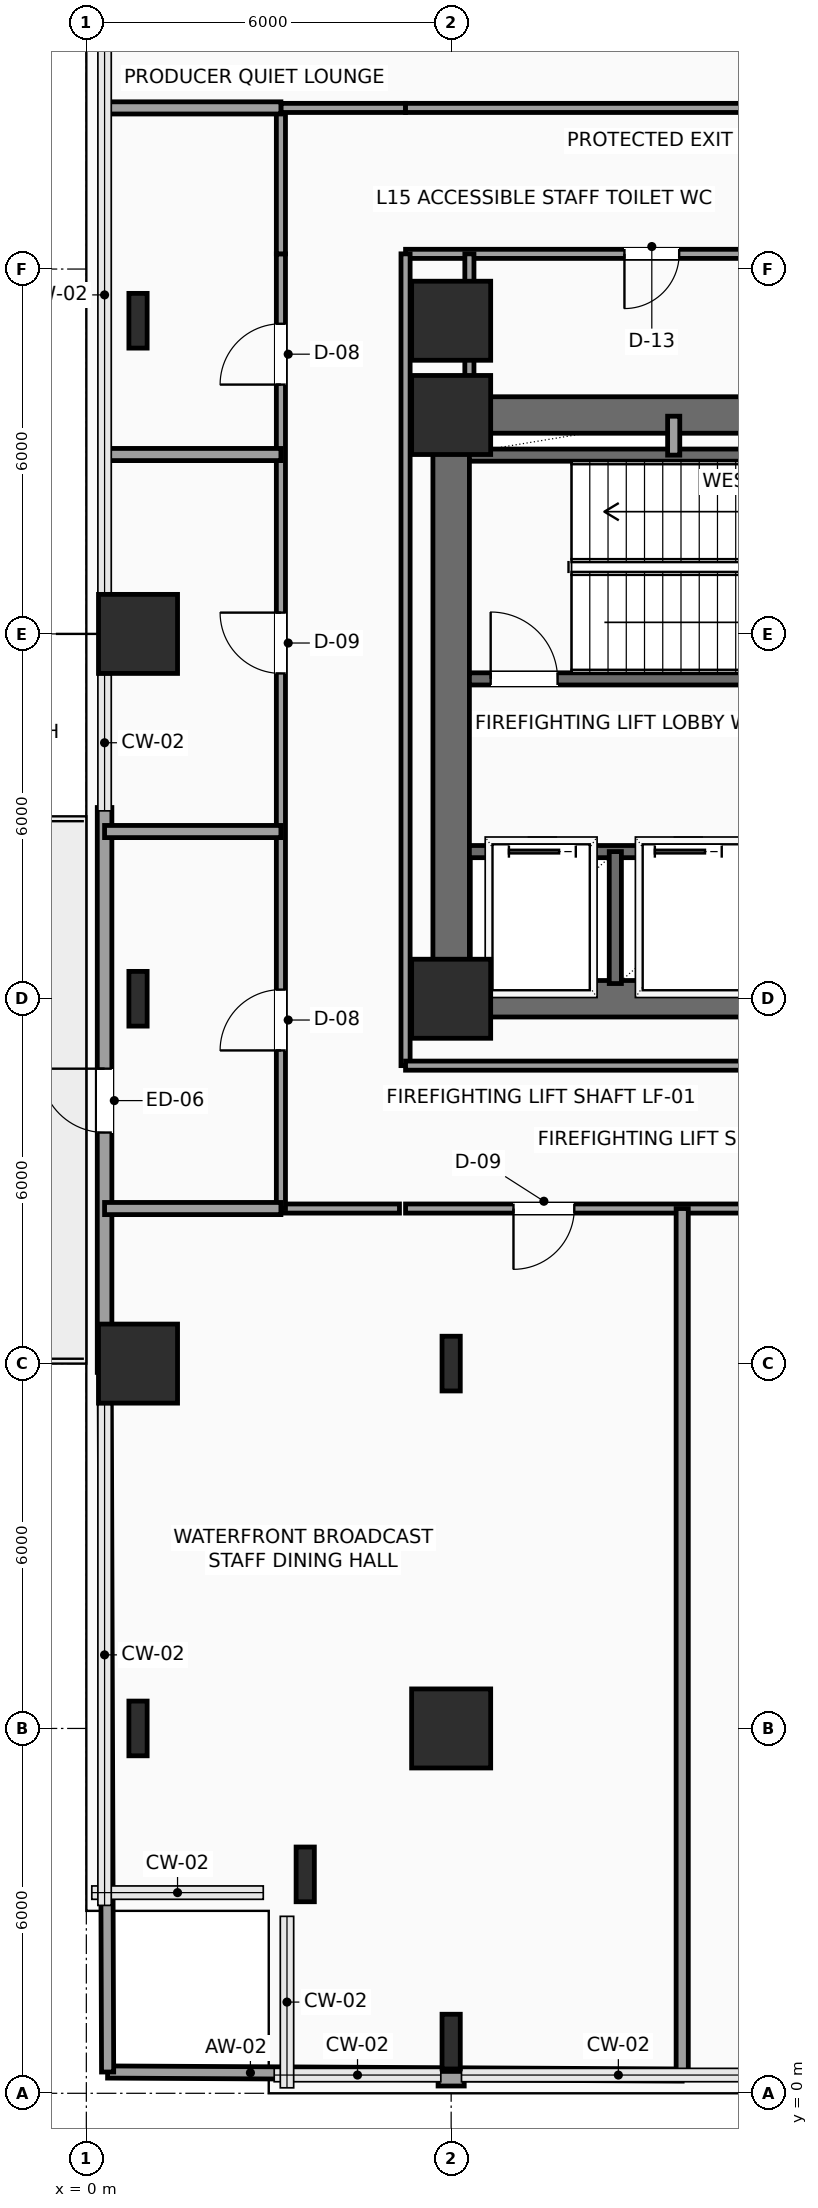
"""IFC4 building model, lengths in metres.
Left out: names, types, materials, properties, quantities, classifications, styles, units other than length and angle.
Written with IfcOpenShell. Run it as: python <this file> out.ifc"""

import sys

from ifc_helpers import new_model, si_unit, direction, frame, frame_2d, origin, origin_2d, place, context, subcontext, project, spatial, rectangle, i_section, extrude, element, fill, save


model = new_model("IFC4")
c1 = context("Model", 3, precision=1e-05, world=origin(), true_north=direction((0.0, 1.0)))
c2 = subcontext(c1, "Body", "Model", "MODEL_VIEW")
j1 = project(units=[si_unit("LENGTHUNIT", "METRE"), si_unit("PLANEANGLEUNIT", "RADIAN")], contexts=[c1])
p1 = place(None, origin())
s1 = spatial("IfcSite", under=j1, at=p1, CompositionType="ELEMENT")
p2 = place(p1, origin())
s2 = spatial("IfcBuilding", under=s1, at=p2, CompositionType="ELEMENT")
p3 = place(p2, frame((0.0, 0.0, 67.5)))
s3 = spatial("IfcBuildingStorey", under=s2, at=p3, CompositionType="ELEMENT", Elevation=67.5)
for number, where, z_axis, x_axis in (
    (1, (6.0, 18.0, 0.0), (0.0, 0.0, 1.0), (1.0, 0.0, 0.0)),
    (2, (6.0, 27.6, 0.0), (0.0, 0.0, 1.0), (1.0, 0.0, 0.0)),
):
    element("IfcColumn", number, at=place(p3, frame(where, z_axis=z_axis, x_axis=x_axis)), inside=s3, PredefinedType="COLUMN", context=c2, shape_type="SweptSolid", body=[
        extrude(rectangle(XDim=1.3, YDim=1.3, at=origin_2d()), origin(), (0.0, 0.0, 1.0), 3.9),
    ])
for number, where, z_axis, x_axis in (
    (3, (3.6, 3.6, 0.0), (0.0, 0.0, 1.0), (1.0, 0.0, 0.0)),
    (4, (0.85, 6.0, 0.0), (0.0, 0.0, 1.0), (1.0, 0.0, 0.0)),
):
    element("IfcColumn", number, at=place(p3, frame(where, z_axis=z_axis, x_axis=x_axis)), inside=s3, PredefinedType="COLUMN", context=c2, shape_type="SweptSolid", body=[
        extrude(i_section(OverallWidth=0.3, OverallDepth=0.9, WebThickness=0.019, FlangeThickness=0.035, FilletRadius=0.03, at=origin_2d()), origin(), (0.0, 0.0, 1.0), 3.9),
    ])
p4 = place(p3, frame((0.85, 12.0, 0.0), z_axis=(0.0, 0.0, 1.0), x_axis=(1.0, 0.0, 0.0)))
e5 = element("IfcColumn", 5, at=p4, inside=s3, PredefinedType="COLUMN", context=c2, shape_type="SweptSolid", body=[
    extrude(rectangle(XDim=1.3, YDim=1.3, at=origin_2d()), origin(), (0.0, 0.0, 1.0), 3.9),
])
p5 = place(p3, frame((0.85, 18.0, 0.0), z_axis=(0.0, 0.0, 1.0), x_axis=(1.0, 0.0, 0.0)))
e6 = element("IfcColumn", 6, at=p5, inside=s3, PredefinedType="COLUMN", context=c2, shape_type="SweptSolid", body=[
    extrude(i_section(OverallWidth=0.3, OverallDepth=0.9, WebThickness=0.019, FlangeThickness=0.035, FilletRadius=0.03, at=origin_2d()), origin(), (0.0, 0.0, 1.0), 3.9),
])
p6 = place(p3, frame((0.85, 24.0, 0.0), z_axis=(0.0, 0.0, 1.0), x_axis=(1.0, 0.0, 0.0)))
e7 = element("IfcColumn", 7, at=p6, inside=s3, PredefinedType="COLUMN", context=c2, shape_type="SweptSolid", body=[
    extrude(rectangle(XDim=1.3, YDim=1.3, at=origin_2d()), origin(), (0.0, 0.0, 1.0), 3.9),
])
for number, where, z_axis, x_axis in (
    (8, (0.85, 29.15, 0.0), (0.0, 0.0, 1.0), (1.0, 0.0, 0.0)),
    (9, (6.0, 0.85, 0.0), (0.0, 0.0, 1.0), (1.0, 0.0, 0.0)),
):
    element("IfcColumn", number, at=place(p3, frame(where, z_axis=z_axis, x_axis=x_axis)), inside=s3, PredefinedType="COLUMN", context=c2, shape_type="SweptSolid", body=[
        extrude(i_section(OverallWidth=0.3, OverallDepth=0.9, WebThickness=0.019, FlangeThickness=0.035, FilletRadius=0.03, at=origin_2d()), origin(), (0.0, 0.0, 1.0), 3.9),
    ])
p7 = place(p3, frame((6.0, 6.0, 0.0), z_axis=(0.0, 0.0, 1.0), x_axis=(1.0, 0.0, 0.0)))
e10 = element("IfcColumn", 10, at=p7, inside=s3, PredefinedType="COLUMN", context=c2, shape_type="SweptSolid", body=[
    extrude(rectangle(XDim=1.3, YDim=1.3, at=origin_2d()), origin(), (0.0, 0.0, 1.0), 3.9),
])
p8 = place(p3, frame((6.0, 12.0, 0.0), z_axis=(0.0, 0.0, 1.0), x_axis=(1.0, 0.0, 0.0)))
e11 = element("IfcColumn", 11, at=p8, inside=s3, PredefinedType="COLUMN", context=c2, shape_type="SweptSolid", body=[
    extrude(i_section(OverallWidth=0.3, OverallDepth=0.9, WebThickness=0.019, FlangeThickness=0.035, FilletRadius=0.03, at=origin_2d()), origin(), (0.0, 0.0, 1.0), 3.9),
])
p9 = place(p3, frame((6.0, 29.15, 0.0), z_axis=(0.0, 0.0, 1.0), x_axis=(1.0, 0.0, 0.0)))
e12 = element("IfcColumn", 12, at=p9, inside=s3, PredefinedType="COLUMN", context=c2, shape_type="SweptSolid", body=[
    extrude(rectangle(XDim=1.3, YDim=1.3, at=origin_2d()), origin(), (0.0, 0.0, 1.0), 3.9),
])
p10 = place(p3, frame((0.3, 11.855, 0.0), z_axis=(0.0, 0.0, 1.0), x_axis=(0.0, 1.0, 0.0)))
e13 = element("IfcWall", 13, at=p10, inside=s3, PredefinedType="SOLIDWALL", context=c2, shape_type="SweptSolid", body=[
    extrude(rectangle(XDim=9.29, YDim=0.24, at=frame_2d((4.645, 0.0))), origin(), (0.0, 0.0, 1.0), 3.65),
])
p11 = place(p10, frame((3.945, 0.0, 0.0)))
e14 = element("IfcOpeningElement", 14, at=p11, cuts=e13, PredefinedType="OPENING", context=c2, shape_type="SweptSolid", body=[
    extrude(rectangle(XDim=1.05, YDim=2.2, at=frame_2d((0.525, 1.1))), frame((0.0, 0.13, 0.0), z_axis=(0.0, -1.0, 0.0), x_axis=(1.0, 0.0, 0.0)), (0.0, 0.0, 1.0), 0.26),
])
p12 = place(p3, frame((6.215, 0.24, 0.0), z_axis=(0.0, 0.0, 1.0), x_axis=(-1.0, 0.0, 0.0)))
e15 = element("IfcWall", 15, at=p12, inside=s3, PredefinedType="SOLIDWALL", context=c2, shape_type="SweptSolid", body=[
    extrude(rectangle(XDim=0.43, YDim=0.24, at=frame_2d((0.215, 0.0))), origin(), (0.0, 0.0, 1.0), 3.65),
])
p13 = place(p3, frame((6.0, 18.0, 0.0), z_axis=(0.0, 0.0, 1.0), x_axis=(1.0, 0.0, 0.0)))
e16 = element("IfcWall", 16, at=p13, inside=s3, PredefinedType="SHEAR", context=c2, shape_type="SweptSolid", body=[
    extrude(rectangle(XDim=12.0, YDim=0.6, at=frame_2d((6.0, 0.0))), origin(), (0.0, 0.0, 1.0), 3.65),
])
p14 = place(p13, frame((7.15, 0.0, 0.0)))
e17 = element("IfcOpeningElement", 17, at=p14, cuts=e16, PredefinedType="OPENING", context=c2, shape_type="SweptSolid", body=[
    extrude(rectangle(XDim=1.6, YDim=2.3, at=frame_2d((0.8, 1.15))), frame((0.0, 0.31, 0.0), z_axis=(0.0, -1.0, 0.0), x_axis=(1.0, 0.0, 0.0)), (0.0, 0.0, 1.0), 0.62),
])
p15 = place(p3, frame((6.0, 27.6, 0.0), z_axis=(0.0, 0.0, 1.0), x_axis=(1.0, 0.0, 0.0)))
e18 = element("IfcWall", 18, at=p15, inside=s3, PredefinedType="SHEAR", context=c2, shape_type="SweptSolid", body=[
    extrude(rectangle(XDim=12.0, YDim=0.6, at=frame_2d((6.0, 0.0))), origin(), (0.0, 0.0, 1.0), 3.65),
])
p16 = place(p15, frame((10.2, 0.0, 0.0)))
e19 = element("IfcOpeningElement", 19, at=p16, cuts=e18, PredefinedType="OPENING", context=c2, shape_type="SweptSolid", body=[
    extrude(rectangle(XDim=0.9, YDim=2.15, at=frame_2d((0.45, 1.075))), frame((0.0, 0.31, 0.0), z_axis=(0.0, -1.0, 0.0), x_axis=(1.0, 0.0, 0.0)), (0.0, 0.0, 1.0), 0.62),
])
p17 = place(p3, frame((6.0, 18.0, 0.0), z_axis=(0.0, 0.0, 1.0), x_axis=(0.0, 1.0, 0.0)))
e20 = element("IfcWall", 20, at=p17, inside=s3, PredefinedType="SHEAR", context=c2, shape_type="SweptSolid", body=[
    extrude(rectangle(XDim=9.6, YDim=0.6, at=frame_2d((4.8, 0.0))), origin(), (0.0, 0.0, 1.0), 3.65),
])
p18 = place(p3, frame((6.3, 23.26, 0.0), z_axis=(0.0, 0.0, 1.0), x_axis=(1.0, 0.0, 0.0)))
e21 = element("IfcWall", 21, at=p18, inside=s3, PredefinedType="SHEAR", context=c2, shape_type="SweptSolid", body=[
    extrude(rectangle(XDim=8.88, YDim=0.2, at=frame_2d((4.44, 0.0))), origin(), (0.0, 0.0, 1.0), 3.65),
])
p19 = place(p18, frame((0.35, 0.0, 0.0)))
e22 = element("IfcOpeningElement", 22, at=p19, cuts=e21, PredefinedType="OPENING", context=c2, shape_type="SweptSolid", body=[
    extrude(rectangle(XDim=1.1, YDim=2.2, at=frame_2d((0.55, 1.1))), frame((0.0, 0.11, 0.0), z_axis=(0.0, -1.0, 0.0), x_axis=(1.0, 0.0, 0.0)), (0.0, 0.0, 1.0), 0.22),
])
p20 = place(p3, frame((6.3, 26.94, 0.0), z_axis=(0.0, 0.0, 1.0), x_axis=(1.0, 0.0, 0.0)))
e23 = element("IfcWall", 23, at=p20, inside=s3, PredefinedType="SHEAR", context=c2, shape_type="SweptSolid", body=[
    extrude(rectangle(XDim=8.88, YDim=0.2, at=frame_2d((4.44, 0.0))), origin(), (0.0, 0.0, 1.0), 3.65),
])
p21 = place(p3, frame((6.3, 20.42, 0.0), z_axis=(0.0, 0.0, 1.0), x_axis=(1.0, 0.0, 0.0)))
e24 = element("IfcWall", 24, at=p21, inside=s3, PredefinedType="SHEAR", context=c2, shape_type="SweptSolid", body=[
    extrude(rectangle(XDim=4.95, YDim=0.2, at=frame_2d((2.475, 0.0))), origin(), (0.0, 0.0, 1.0), 3.65),
])
p22 = place(p21, frame((0.65, 0.0, 0.0)))
e25 = element("IfcOpeningElement", 25, at=p22, cuts=e24, PredefinedType="OPENING", context=c2, shape_type="SweptSolid", body=[
    extrude(rectangle(XDim=1.1, YDim=2.2, at=frame_2d((0.55, 1.1))), frame((0.0, 0.11, 0.0), z_axis=(0.0, -1.0, 0.0), x_axis=(1.0, 0.0, 0.0)), (0.0, 0.0, 1.0), 0.22),
])
p23 = place(p21, frame((3.05, 0.0, 0.0)))
e26 = element("IfcOpeningElement", 26, at=p23, cuts=e24, PredefinedType="OPENING", context=c2, shape_type="SweptSolid", body=[
    extrude(rectangle(XDim=1.1, YDim=2.2, at=frame_2d((0.55, 1.1))), frame((0.0, 0.11, 0.0), z_axis=(0.0, -1.0, 0.0), x_axis=(1.0, 0.0, 0.0)), (0.0, 0.0, 1.0), 0.22),
])
p24 = place(p3, frame((8.7, 18.25, 0.0), z_axis=(0.0, 0.0, 1.0), x_axis=(0.0, 1.0, 0.0)))
e27 = element("IfcWall", 27, at=p24, inside=s3, PredefinedType="SHEAR", context=c2, shape_type="SweptSolid", body=[
    extrude(rectangle(XDim=2.17, YDim=0.2, at=frame_2d((1.085, 0.0))), origin(), (0.0, 0.0, 1.0), 3.65),
])
p25 = place(p3, frame((9.66, 26.94, 0.0), z_axis=(0.0, 0.0, 1.0), x_axis=(0.0, 1.0, 0.0)))
e28 = element("IfcWall", 28, at=p25, inside=s3, PredefinedType="SOLIDWALL", context=c2, shape_type="SweptSolid", body=[
    extrude(rectangle(XDim=0.64, YDim=0.2, at=frame_2d((0.32, 0.0))), origin(), (0.0, 0.0, 1.0), 3.65),
])
p26 = place(p3, frame((12.4, 14.55, 0.0), z_axis=(0.0, 0.0, 1.0), x_axis=(-1.0, 0.0, 0.0)))
e29 = element("IfcWall", 29, at=p26, inside=s3, PredefinedType="PARTITIONING", context=c2, shape_type="SweptSolid", body=[
    extrude(rectangle(XDim=7.15, YDim=0.15, at=frame_2d((3.575, 0.0))), origin(), (0.0, 0.0, 1.0), 3.65),
])
p27 = place(p26, frame((4.375, 0.0, 0.0)))
e30 = element("IfcOpeningElement", 30, at=p27, cuts=e29, PredefinedType="OPENING", context=c2, shape_type="SweptSolid", body=[
    extrude(rectangle(XDim=1.0, YDim=2.2, at=frame_2d((0.5, 1.1))), frame((0.0, 0.085, 0.0), z_axis=(0.0, -1.0, 0.0), x_axis=(1.0, 0.0, 0.0)), (0.0, 0.0, 1.0), 0.17),
])
p28 = place(p3, frame((5.15, 14.55, 0.0), z_axis=(0.0, 0.0, 1.0), x_axis=(-1.0, 0.0, 0.0)))
e31 = element("IfcWall", 31, at=p28, inside=s3, PredefinedType="PARTITIONING", context=c2, shape_type="SweptSolid", body=[
    extrude(rectangle(XDim=1.95, YDim=0.15, at=frame_2d((0.975, 0.0))), origin(), (0.0, 0.0, 1.0), 3.65),
])
p29 = place(p3, frame((3.2, 14.55, 0.0), z_axis=(0.0, 0.0, 1.0), x_axis=(0.0, 1.0, 0.0)))
e32 = element("IfcWall", 32, at=p29, inside=s3, PredefinedType="PARTITIONING", context=c2, shape_type="SweptSolid", body=[
    extrude(rectangle(XDim=15.7, YDim=0.15, at=frame_2d((7.85, 0.0))), origin(), (0.0, 0.0, 1.0), 3.65),
])
p30 = place(p29, frame((2.6, 0.0, 0.0)))
e33 = element("IfcOpeningElement", 33, at=p30, cuts=e32, PredefinedType="OPENING", context=c2, shape_type="SweptSolid", body=[
    extrude(rectangle(XDim=1.0, YDim=2.2, at=frame_2d((0.5, 1.1))), frame((0.0, 0.085, 0.0), z_axis=(0.0, -1.0, 0.0), x_axis=(1.0, 0.0, 0.0)), (0.0, 0.0, 1.0), 0.17),
])
p31 = place(p29, frame((8.8, 0.0, 0.0)))
e34 = element("IfcOpeningElement", 34, at=p31, cuts=e32, PredefinedType="OPENING", context=c2, shape_type="SweptSolid", body=[
    extrude(rectangle(XDim=1.0, YDim=2.2, at=frame_2d((0.5, 1.1))), frame((0.0, 0.085, 0.0), z_axis=(0.0, -1.0, 0.0), x_axis=(1.0, 0.0, 0.0)), (0.0, 0.0, 1.0), 0.17),
])
p32 = place(p29, frame((13.55, 0.0, 0.0)))
e35 = element("IfcOpeningElement", 35, at=p32, cuts=e32, PredefinedType="OPENING", context=c2, shape_type="SweptSolid", body=[
    extrude(rectangle(XDim=1.0, YDim=2.2, at=frame_2d((0.5, 1.1))), frame((0.0, 0.085, 0.0), z_axis=(0.0, -1.0, 0.0), x_axis=(1.0, 0.0, 0.0)), (0.0, 0.0, 1.0), 0.17),
])
p33 = place(p3, frame((3.2, 30.25, 0.0), z_axis=(0.0, 0.0, 1.0), x_axis=(0.0, 1.0, 0.0)))
e36 = element("IfcWall", 36, at=p33, inside=s3, PredefinedType="PARTITIONING", context=c2, shape_type="SweptSolid", body=[
    extrude(rectangle(XDim=2.4, YDim=0.15, at=frame_2d((1.2, 0.0))), origin(), (0.0, 0.0, 1.0), 3.65),
])
p34 = place(p3, frame((3.2, 32.65, 0.0), z_axis=(0.0, 0.0, 1.0), x_axis=(1.0, 0.0, 0.0)))
e37 = element("IfcWall", 37, at=p34, inside=s3, PredefinedType="PARTITIONING", context=c2, shape_type="SweptSolid", body=[
    extrude(rectangle(XDim=2.05, YDim=0.15, at=frame_2d((1.025, 0.0))), origin(), (0.0, 0.0, 1.0), 3.65),
])
p35 = place(p3, frame((5.25, 32.65, 0.0), z_axis=(0.0, 0.0, 1.0), x_axis=(1.0, 0.0, 0.0)))
e38 = element("IfcWall", 38, at=p35, inside=s3, PredefinedType="PARTITIONING", context=c2, shape_type="SweptSolid", body=[
    extrude(rectangle(XDim=8.55, YDim=0.15, at=frame_2d((4.275, 0.0))), origin(), (0.0, 0.0, 1.0), 3.65),
])
p36 = place(p3, frame((15.88, 30.25, 0.0), z_axis=(0.0, 0.0, 1.0), x_axis=(-1.0, 0.0, 0.0)))
e39 = element("IfcWall", 39, at=p36, inside=s3, PredefinedType="PARTITIONING", context=c2, shape_type="SweptSolid", body=[
    extrude(rectangle(XDim=10.63, YDim=0.15, at=frame_2d((5.315, 0.0))), origin(), (0.0, 0.0, 1.0), 3.65),
])
p37 = place(p36, frame((6.13, 0.0, 0.0)))
e40 = element("IfcOpeningElement", 40, at=p37, cuts=e39, PredefinedType="OPENING", context=c2, shape_type="SweptSolid", body=[
    extrude(rectangle(XDim=0.9, YDim=2.1, at=frame_2d((0.45, 1.05))), frame((0.0, 0.085, 0.0), z_axis=(0.0, -1.0, 0.0), x_axis=(1.0, 0.0, 0.0)), (0.0, 0.0, 1.0), 0.17),
])
p38 = place(p3, frame((5.25, 30.25, 0.0), z_axis=(0.0, 0.0, 1.0), x_axis=(0.0, -1.0, 0.0)))
e41 = element("IfcWall", 41, at=p38, inside=s3, PredefinedType="PARTITIONING", context=c2, shape_type="SweptSolid", body=[
    extrude(rectangle(XDim=13.35, YDim=0.15, at=frame_2d((6.675, 0.0))), origin(), (0.0, 0.0, 1.0), 3.65),
])
p39 = place(p3, frame((5.25, 16.9, 0.0), z_axis=(0.0, 0.0, 1.0), x_axis=(1.0, 0.0, 0.0)))
e42 = element("IfcWall", 42, at=p39, inside=s3, PredefinedType="PARTITIONING", context=c2, shape_type="SweptSolid", body=[
    extrude(rectangle(XDim=7.15, YDim=0.15, at=frame_2d((3.575, 0.0))), origin(), (0.0, 0.0, 1.0), 3.65),
])
p40 = place(p3, frame((6.3, 27.68, 0.0), z_axis=(0.0, 0.0, 1.0), x_axis=(0.0, 1.0, 0.0)))
e43 = element("IfcWall", 43, at=p40, inside=s3, PredefinedType="PARTITIONING", context=c2, shape_type="SweptSolid", body=[
    extrude(rectangle(XDim=2.57, YDim=0.15, at=frame_2d((1.285, 0.0))), origin(), (0.0, 0.0, 1.0), 2.992),
])
p41 = place(p3, frame((0.35, 0.35, 0.0), z_axis=(0.0, 0.0, 1.0), x_axis=(0.99998595132, -0.005300675722, 0.0)))
e44 = element("IfcWall", 44, at=p41, inside=s3, PredefinedType="PARTITIONING", context=c2, shape_type="SweptSolid", body=[
    extrude(rectangle(XDim=5.435, YDim=0.2, at=frame_2d((2.717, 0.0))), origin(), (0.0, 0.0, 1.0), 3.65),
])
p42 = place(p3, frame((6.215, 0.319, 0.0), z_axis=(0.0, 0.0, 1.0), x_axis=(0.999985892136, -0.005311829174, 0.0)))
e45 = element("IfcWall", 45, at=p42, inside=s3, PredefinedType="PARTITIONING", context=c2, shape_type="SweptSolid", body=[
    extrude(rectangle(XDim=3.585, YDim=0.2, at=frame_2d((1.792, 0.0))), origin(), (0.0, 0.0, 1.0), 3.65),
])
p43 = place(p3, frame((0.35, 0.35, 0.0), z_axis=(0.0, 0.0, 1.0), x_axis=(-0.003522599314, 0.999993795628, 0.0)))
e46 = element("IfcWall", 46, at=p43, inside=s3, PredefinedType="PARTITIONING", context=c2, shape_type="SweptSolid", body=[
    extrude(rectangle(XDim=11.505, YDim=0.2, at=frame_2d((5.752, 0.0))), origin(), (0.0, 0.0, 1.0), 3.65),
])
p44 = place(p3, frame((9.8, 0.3, 0.0), z_axis=(0.0, 0.0, 1.0), x_axis=(0.0, 1.0, 0.0)))
e47 = element("IfcWall", 47, at=p44, inside=s3, PredefinedType="PARTITIONING", context=c2, shape_type="SweptSolid", body=[
    extrude(rectangle(XDim=14.25, YDim=0.2, at=frame_2d((7.125, 0.0))), origin(), (0.0, 0.0, 1.0), 3.65),
])
p45 = place(p3, frame((0.3, 14.55, 0.0), z_axis=(0.0, 0.0, 1.0), x_axis=(1.0, 0.0, 0.0)))
e48 = element("IfcWall", 48, at=p45, inside=s3, PredefinedType="PARTITIONING", context=c2, shape_type="SweptSolid", body=[
    extrude(rectangle(XDim=2.9, YDim=0.2, at=frame_2d((1.45, 0.0))), origin(), (0.0, 0.0, 1.0), 3.65),
])
p46 = place(p3, frame((0.3, 20.75, 0.0), z_axis=(0.0, 0.0, 1.0), x_axis=(1.0, 0.0, 0.0)))
e49 = element("IfcWall", 49, at=p46, inside=s3, PredefinedType="PARTITIONING", context=c2, shape_type="SweptSolid", body=[
    extrude(rectangle(XDim=2.9, YDim=0.2, at=frame_2d((1.45, 0.0))), origin(), (0.0, 0.0, 1.0), 3.142),
])
for number, where, z_axis, x_axis in (
    (50, (0.3, 26.95, 0.0), (0.0, 0.0, 1.0), (1.0, 0.0, 0.0)),
    (51, (0.3, 32.65, 0.0), (0.0, 0.0, 1.0), (1.0, 0.0, 0.0)),
):
    element("IfcWall", number, at=place(p3, frame(where, z_axis=z_axis, x_axis=x_axis)), inside=s3, PredefinedType="PARTITIONING", context=c2, shape_type="SweptSolid", body=[
        extrude(rectangle(XDim=2.9, YDim=0.2, at=frame_2d((1.45, 0.0))), origin(), (0.0, 0.0, 1.0), 3.65),
    ])
p47 = place(p11, origin())
e52 = element("IfcDoor", 52, at=p47, inside=s3, OperationType="SINGLE_SWING_RIGHT", PredefinedType="DOOR", context=c2, shape_type="SweptSolid", body=[
    extrude(rectangle(XDim=1.05, YDim=2.2, at=frame_2d((0.525, 1.1))), frame((0.0, 0.025, 0.0), z_axis=(0.0, -1.0, 0.0), x_axis=(1.0, 0.0, 0.0)), (0.0, 0.0, 1.0), 0.05),
])
fill(e14, e52)
p48 = place(p19, origin())
e53 = element("IfcDoor", 53, at=p48, inside=s3, OperationType="SINGLE_SWING_LEFT", PredefinedType="DOOR", context=c2, shape_type="SweptSolid", body=[
    extrude(rectangle(XDim=1.1, YDim=2.2, at=frame_2d((0.55, 1.1))), frame((0.0, 0.025, 0.0), z_axis=(0.0, -1.0, 0.0), x_axis=(1.0, 0.0, 0.0)), (0.0, 0.0, 1.0), 0.05),
])
fill(e22, e53)
p49 = place(p22, origin())
e54 = element("IfcDoor", 54, at=p49, inside=s3, OperationType="SLIDING_TO_LEFT", PredefinedType="DOOR", context=c2, shape_type="SweptSolid", body=[
    extrude(rectangle(XDim=1.1, YDim=2.2, at=frame_2d((0.55, 1.1))), frame((0.0, 0.025, 0.0), z_axis=(0.0, -1.0, 0.0), x_axis=(1.0, 0.0, 0.0)), (0.0, 0.0, 1.0), 0.05),
])
fill(e25, e54)
p50 = place(p23, origin())
e55 = element("IfcDoor", 55, at=p50, inside=s3, OperationType="SLIDING_TO_LEFT", PredefinedType="DOOR", context=c2, shape_type="SweptSolid", body=[
    extrude(rectangle(XDim=1.1, YDim=2.2, at=frame_2d((0.55, 1.1))), frame((0.0, 0.025, 0.0), z_axis=(0.0, -1.0, 0.0), x_axis=(1.0, 0.0, 0.0)), (0.0, 0.0, 1.0), 0.05),
])
fill(e26, e55)
p51 = place(p27, origin())
e56 = element("IfcDoor", 56, at=p51, inside=s3, OperationType="SINGLE_SWING_RIGHT", PredefinedType="DOOR", context=c2, shape_type="SweptSolid", body=[
    extrude(rectangle(XDim=1.0, YDim=2.2, at=frame_2d((0.5, 1.1))), frame((0.0, 0.025, 0.0), z_axis=(0.0, -1.0, 0.0), x_axis=(1.0, 0.0, 0.0)), (0.0, 0.0, 1.0), 0.05),
])
fill(e30, e56)
p52 = place(p30, origin())
e57 = element("IfcDoor", 57, at=p52, inside=s3, OperationType="SINGLE_SWING_LEFT", PredefinedType="DOOR", context=c2, shape_type="SweptSolid", body=[
    extrude(rectangle(XDim=1.0, YDim=2.2, at=frame_2d((0.5, 1.1))), frame((0.0, 0.025, 0.0), z_axis=(0.0, -1.0, 0.0), x_axis=(1.0, 0.0, 0.0)), (0.0, 0.0, 1.0), 0.05),
])
fill(e33, e57)
p53 = place(p31, origin())
e58 = element("IfcDoor", 58, at=p53, inside=s3, OperationType="SINGLE_SWING_RIGHT", PredefinedType="DOOR", context=c2, shape_type="SweptSolid", body=[
    extrude(rectangle(XDim=1.0, YDim=2.2, at=frame_2d((0.5, 1.1))), frame((0.0, 0.025, 0.0), z_axis=(0.0, -1.0, 0.0), x_axis=(1.0, 0.0, 0.0)), (0.0, 0.0, 1.0), 0.05),
])
fill(e34, e58)
p54 = place(p32, origin())
e59 = element("IfcDoor", 59, at=p54, inside=s3, OperationType="SINGLE_SWING_LEFT", PredefinedType="DOOR", context=c2, shape_type="SweptSolid", body=[
    extrude(rectangle(XDim=1.0, YDim=2.2, at=frame_2d((0.5, 1.1))), frame((0.0, 0.025, 0.0), z_axis=(0.0, -1.0, 0.0), x_axis=(1.0, 0.0, 0.0)), (0.0, 0.0, 1.0), 0.05),
])
fill(e35, e59)
p55 = place(p37, origin())
e60 = element("IfcDoor", 60, at=p55, inside=s3, OperationType="SINGLE_SWING_RIGHT", PredefinedType="DOOR", context=c2, shape_type="SweptSolid", body=[
    extrude(rectangle(XDim=0.9, YDim=2.1, at=frame_2d((0.45, 1.05))), frame((0.0, 0.025, 0.0), z_axis=(0.0, -1.0, 0.0), x_axis=(1.0, 0.0, 0.0)), (0.0, 0.0, 1.0), 0.05),
])
fill(e40, e60)
save(model, sys.argv[1])
